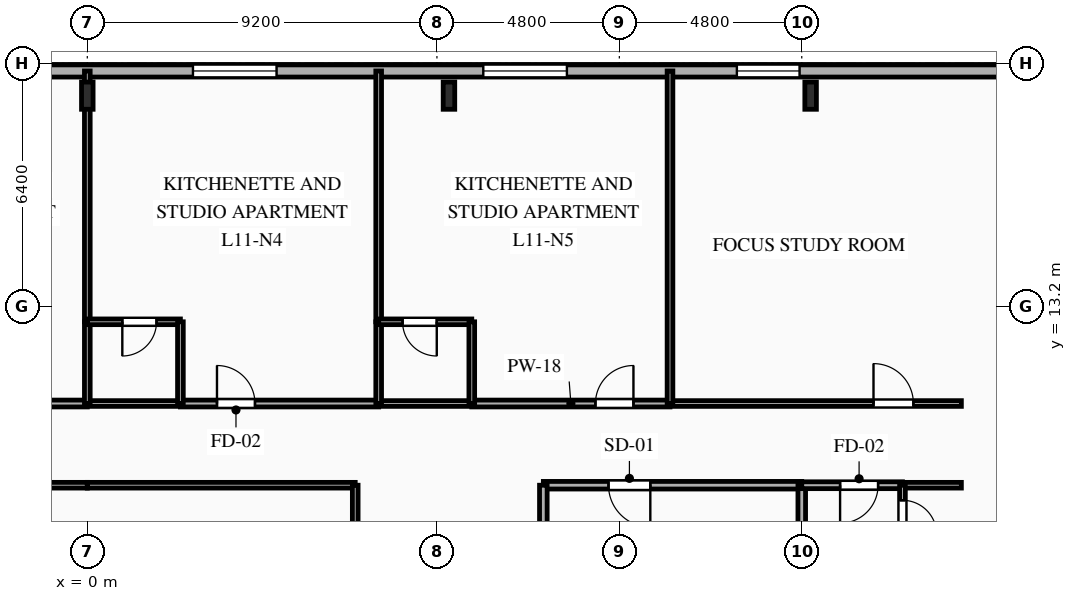
"""IFC4 building model, lengths in metres.
Left out: names, types, materials, properties, quantities, classifications, styles, units other than length and angle.
Written with IfcOpenShell. Run it as: python <this file> out.ifc"""

import sys

from ifc_helpers import new_model, si_unit, direction, frame, frame_2d, origin, origin_2d, place, context, subcontext, project, spatial, rectangle, i_section, extrude, element, fill, save


model = new_model("IFC4")
c1 = context("Model", 3, precision=1e-05, world=origin(), true_north=direction((0.0, 1.0)))
c2 = subcontext(c1, "Body", "Model", "MODEL_VIEW")
j1 = project(units=[si_unit("LENGTHUNIT", "METRE"), si_unit("PLANEANGLEUNIT", "RADIAN")], contexts=[c1])
p1 = place(None, origin())
s1 = spatial("IfcSite", under=j1, at=p1, CompositionType="ELEMENT")
p2 = place(p1, origin())
s2 = spatial("IfcBuilding", under=s1, at=p2, CompositionType="ELEMENT")
p3 = place(p2, frame((0.0, 0.0, 43.75)))
s3 = spatial("IfcBuildingStorey", under=s2, at=p3, CompositionType="ELEMENT", Elevation=43.75)
for number, where, z_axis, x_axis in (
    (1, (19.033, 18.75, 0.0), (0.0, 0.0, 1.0), (1.0, 0.0, 0.0)),
    (2, (9.517, 18.75, 0.0), (0.0, 0.0, 1.0), (1.0, 0.0, 0.0)),
    (3, (0.0, 18.75, 0.0), (0.0, 0.0, 1.0), (1.0, 0.0, 0.0)),
):
    element("IfcColumn", number, at=place(p3, frame(where, z_axis=z_axis, x_axis=x_axis)), inside=s3, PredefinedType="COLUMN", context=c2, shape_type="SweptSolid", body=[
        extrude(i_section(OverallWidth=0.304, OverallDepth=0.716, WebThickness=0.021, FlangeThickness=0.04, FilletRadius=0.027, at=origin_2d()), origin(), (0.0, 0.0, 1.0), 3.35),
    ])
p4 = place(p3, frame((-29.2, 19.4, 0.0), z_axis=(0.0, 0.0, 1.0), x_axis=(1.0, 0.0, 0.0)))
e4 = element("IfcWall", 4, at=p4, inside=s3, PredefinedType="SOLIDWALL", context=c2, shape_type="SweptSolid", body=[
    extrude(rectangle(XDim=58.4, YDim=0.32, at=frame_2d((29.2, 0.0))), origin(), (0.0, 0.0, 1.0), 3.035),
])
p5 = place(p4, frame((7.972, 0.0, 0.85)))
e5 = element("IfcOpeningElement", 5, at=p5, cuts=e4, PredefinedType="OPENING", context=c2, shape_type="SweptSolid", body=[
    extrude(rectangle(XDim=1.65, YDim=1.85, at=frame_2d((0.825, 0.925))), frame((0.0, 0.17, 0.0), z_axis=(0.0, -1.0, 0.0), x_axis=(1.0, 0.0, 0.0)), (0.0, 0.0, 1.0), 0.34),
])
p6 = place(p4, frame((17.691, 0.0, 0.85)))
e6 = element("IfcOpeningElement", 6, at=p6, cuts=e4, PredefinedType="OPENING", context=c2, shape_type="SweptSolid", body=[
    extrude(rectangle(XDim=1.6, YDim=1.85, at=frame_2d((0.8, 0.925))), frame((0.0, 0.17, 0.0), z_axis=(0.0, -1.0, 0.0), x_axis=(1.0, 0.0, 0.0)), (0.0, 0.0, 1.0), 0.34),
])
p7 = place(p4, frame((24.3, 0.0, 0.85)))
e7 = element("IfcOpeningElement", 7, at=p7, cuts=e4, PredefinedType="OPENING", context=c2, shape_type="SweptSolid", body=[
    extrude(rectangle(XDim=2.2, YDim=1.85, at=frame_2d((1.1, 0.925))), frame((0.0, 0.17, 0.0), z_axis=(0.0, -1.0, 0.0), x_axis=(1.0, 0.0, 0.0)), (0.0, 0.0, 1.0), 0.34),
])
p8 = place(p4, frame((31.98, 0.0, 0.85)))
e8 = element("IfcOpeningElement", 8, at=p8, cuts=e4, PredefinedType="OPENING", context=c2, shape_type="SweptSolid", body=[
    extrude(rectangle(XDim=2.2, YDim=1.85, at=frame_2d((1.1, 0.925))), frame((0.0, 0.17, 0.0), z_axis=(0.0, -1.0, 0.0), x_axis=(1.0, 0.0, 0.0)), (0.0, 0.0, 1.0), 0.34),
])
p9 = place(p4, frame((39.62, 0.0, 0.85)))
e9 = element("IfcOpeningElement", 9, at=p9, cuts=e4, PredefinedType="OPENING", context=c2, shape_type="SweptSolid", body=[
    extrude(rectangle(XDim=2.2, YDim=1.85, at=frame_2d((1.1, 0.925))), frame((0.0, 0.17, 0.0), z_axis=(0.0, -1.0, 0.0), x_axis=(1.0, 0.0, 0.0)), (0.0, 0.0, 1.0), 0.34),
])
p10 = place(p4, frame((46.292, 0.0, 0.85)))
e10 = element("IfcOpeningElement", 10, at=p10, cuts=e4, PredefinedType="OPENING", context=c2, shape_type="SweptSolid", body=[
    extrude(rectangle(XDim=1.65, YDim=1.85, at=frame_2d((0.825, 0.925))), frame((0.0, 0.17, 0.0), z_axis=(0.0, -1.0, 0.0), x_axis=(1.0, 0.0, 0.0)), (0.0, 0.0, 1.0), 0.34),
])
p11 = place(p3, frame((18.8, 8.5, 0.0), z_axis=(0.0, 0.0, 1.0), x_axis=(-1.0, 0.0, 0.0)))
e11 = element("IfcWall", 11, at=p11, inside=s3, PredefinedType="PARTITIONING", context=c2, shape_type="SweptSolid", body=[
    extrude(rectangle(XDim=6.8, YDim=0.2, at=frame_2d((3.4, 0.0))), origin(), (0.0, 0.0, 1.0), 3.035),
])
p12 = place(p11, frame((3.985, 0.0, 0.0)))
e12 = element("IfcOpeningElement", 12, at=p12, cuts=e11, PredefinedType="OPENING", context=c2, shape_type="SweptSolid", body=[
    extrude(rectangle(XDim=1.1, YDim=2.15, at=frame_2d((0.55, 1.075))), frame((0.0, 0.11, 0.0), z_axis=(0.0, -1.0, 0.0), x_axis=(1.0, 0.0, 0.0)), (0.0, 0.0, 1.0), 0.22),
])
p13 = place(p3, frame((12.0, 8.5, 0.0), z_axis=(0.0, 0.0, 1.0), x_axis=(0.0, -1.0, 0.0)))
e13 = element("IfcWall", 13, at=p13, inside=s3, PredefinedType="PARTITIONING", context=c2, shape_type="SweptSolid", body=[
    extrude(rectangle(XDim=2.9, YDim=0.2, at=frame_2d((1.45, 0.0))), origin(), (0.0, 0.0, 1.0), 3.035),
])
p14 = place(p3, frame((18.8, 5.6, 0.0), z_axis=(0.0, 0.0, 1.0), x_axis=(0.0, 1.0, 0.0)))
e14 = element("IfcWall", 14, at=p14, inside=s3, PredefinedType="PARTITIONING", context=c2, shape_type="SweptSolid", body=[
    extrude(rectangle(XDim=2.9, YDim=0.2, at=frame_2d((1.45, 0.0))), origin(), (0.0, 0.0, 1.0), 2.52),
])
p15 = place(p3, frame((-5.217, 10.65, 0.0), z_axis=(0.0, 0.0, 1.0), x_axis=(1.0, 0.0, 0.0)))
e15 = element("IfcWall", 15, at=p15, inside=s3, PredefinedType="PARTITIONING", context=c2, shape_type="SweptSolid", body=[
    extrude(rectangle(XDim=5.217, YDim=0.18, at=frame_2d((2.608, 0.0))), origin(), (0.0, 0.0, 1.0), 3.035),
])
p16 = place(p15, frame((2.873, 0.0, 0.0)))
e16 = element("IfcOpeningElement", 16, at=p16, cuts=e15, PredefinedType="OPENING", context=c2, shape_type="SweptSolid", body=[
    extrude(rectangle(XDim=1.0, YDim=2.15, at=frame_2d((0.5, 1.075))), frame((0.0, 0.1, 0.0), z_axis=(0.0, -1.0, 0.0), x_axis=(1.0, 0.0, 0.0)), (0.0, 0.0, 1.0), 0.2),
])
p17 = place(p3, frame((0.0, 8.5, 0.0), z_axis=(0.0, 0.0, 1.0), x_axis=(-1.0, 0.0, 0.0)))
e17 = element("IfcWall", 17, at=p17, inside=s3, PredefinedType="PARTITIONING", context=c2, shape_type="SweptSolid", body=[
    extrude(rectangle(XDim=7.05, YDim=0.15, at=frame_2d((3.525, 0.0))), origin(), (0.0, 0.0, 1.0), 3.035),
])
p18 = place(p17, frame((1.185, 0.0, 0.0)))
e18 = element("IfcOpeningElement", 18, at=p18, cuts=e17, PredefinedType="OPENING", context=c2, shape_type="SweptSolid", body=[
    extrude(rectangle(XDim=1.05, YDim=2.15, at=frame_2d((0.525, 1.075))), frame((0.0, 0.085, 0.0), z_axis=(0.0, -1.0, 0.0), x_axis=(1.0, 0.0, 0.0)), (0.0, 0.0, 1.0), 0.17),
])
p19 = place(p3, frame((21.45, 8.5, 0.0), z_axis=(0.0, 0.0, 1.0), x_axis=(-1.0, 0.0, 0.0)))
e19 = element("IfcWall", 19, at=p19, inside=s3, PredefinedType="PARTITIONING", context=c2, shape_type="SweptSolid", body=[
    extrude(rectangle(XDim=2.65, YDim=0.18, at=frame_2d((1.325, 0.0))), origin(), (0.0, 0.0, 1.0), 3.035),
])
p20 = place(p19, frame((0.641, 0.0, 0.0)))
e20 = element("IfcOpeningElement", 20, at=p20, cuts=e19, PredefinedType="OPENING", context=c2, shape_type="SweptSolid", body=[
    extrude(rectangle(XDim=1.0, YDim=2.15, at=frame_2d((0.5, 1.075))), frame((0.0, 0.1, 0.0), z_axis=(0.0, -1.0, 0.0), x_axis=(1.0, 0.0, 0.0)), (0.0, 0.0, 1.0), 0.2),
])
p21 = place(p3, frame((23.0, 8.5, 0.0), z_axis=(0.0, 0.0, 1.0), x_axis=(-1.0, 0.0, 0.0)))
e21 = element("IfcWall", 21, at=p21, inside=s3, PredefinedType="PARTITIONING", context=c2, shape_type="SweptSolid", body=[
    extrude(rectangle(XDim=1.55, YDim=0.15, at=frame_2d((0.775, 0.0))), origin(), (0.0, 0.0, 1.0), 3.035),
])
p22 = place(p3, frame((2.45, 10.65, 0.0), z_axis=(0.0, 0.0, 1.0), x_axis=(1.0, 0.0, 0.0)))
e22 = element("IfcWall", 22, at=p22, inside=s3, PredefinedType="PARTITIONING", context=c2, shape_type="SweptSolid", body=[
    extrude(rectangle(XDim=5.217, YDim=0.18, at=frame_2d((2.608, 0.0))), origin(), (0.0, 0.0, 1.0), 3.035),
])
p23 = place(p22, frame((0.962, 0.0, 0.0)))
e23 = element("IfcOpeningElement", 23, at=p23, cuts=e22, PredefinedType="OPENING", context=c2, shape_type="SweptSolid", body=[
    extrude(rectangle(XDim=1.0, YDim=2.15, at=frame_2d((0.5, 1.075))), frame((0.0, 0.1, 0.0), z_axis=(0.0, -1.0, 0.0), x_axis=(1.0, 0.0, 0.0)), (0.0, 0.0, 1.0), 0.2),
])
p24 = place(p3, frame((0.0, 10.65, 0.0), z_axis=(0.0, 0.0, 1.0), x_axis=(1.0, 0.0, 0.0)))
e24 = element("IfcWall", 24, at=p24, inside=s3, PredefinedType="PLUMBINGWALL", context=c2, shape_type="SweptSolid", body=[
    extrude(rectangle(XDim=2.45, YDim=0.15, at=frame_2d((1.225, 0.0))), origin(), (0.0, 0.0, 1.0), 3.035),
])
p25 = place(p3, frame((10.117, 10.65, 0.0), z_axis=(0.0, 0.0, 1.0), x_axis=(1.0, 0.0, 0.0)))
e25 = element("IfcWall", 25, at=p25, inside=s3, PredefinedType="PARTITIONING", context=c2, shape_type="SweptSolid", body=[
    extrude(rectangle(XDim=5.216, YDim=0.18, at=frame_2d((2.608, 0.0))), origin(), (0.0, 0.0, 1.0), 3.035),
])
p26 = place(p25, frame((3.254, 0.0, 0.0)))
e26 = element("IfcOpeningElement", 26, at=p26, cuts=e25, PredefinedType="OPENING", context=c2, shape_type="SweptSolid", body=[
    extrude(rectangle(XDim=1.0, YDim=2.15, at=frame_2d((0.5, 1.075))), frame((0.0, 0.1, 0.0), z_axis=(0.0, -1.0, 0.0), x_axis=(1.0, 0.0, 0.0)), (0.0, 0.0, 1.0), 0.2),
])
p27 = place(p3, frame((7.667, 10.65, 0.0), z_axis=(0.0, 0.0, 1.0), x_axis=(1.0, 0.0, 0.0)))
e27 = element("IfcWall", 27, at=p27, inside=s3, PredefinedType="PLUMBINGWALL", context=c2, shape_type="SweptSolid", body=[
    extrude(rectangle(XDim=2.45, YDim=0.15, at=frame_2d((1.225, 0.0))), origin(), (0.0, 0.0, 1.0), 3.035),
])
p28 = place(p3, frame((15.333, 10.65, 0.0), z_axis=(0.0, 0.0, 1.0), x_axis=(1.0, 0.0, 0.0)))
e28 = element("IfcWall", 28, at=p28, inside=s3, PredefinedType="PARTITIONING", context=c2, shape_type="SweptSolid", body=[
    extrude(rectangle(XDim=7.667, YDim=0.15, at=frame_2d((3.833, 0.0))), origin(), (0.0, 0.0, 1.0), 3.035),
])
p29 = place(p28, frame((5.355, 0.0, 0.0)))
e29 = element("IfcOpeningElement", 29, at=p29, cuts=e28, PredefinedType="OPENING", context=c2, shape_type="SweptSolid", body=[
    extrude(rectangle(XDim=1.05, YDim=2.15, at=frame_2d((0.525, 1.075))), frame((0.0, 0.085, 0.0), z_axis=(0.0, -1.0, 0.0), x_axis=(1.0, 0.0, 0.0)), (0.0, 0.0, 1.0), 0.17),
])
for number, where, z_axis, x_axis in (
    (30, (7.05, 8.5, 0.0), (0.0, 0.0, 1.0), (-1.0, 0.0, 0.0)),
    (31, (7.05, 1.45, 0.0), (0.0, 0.0, 1.0), (0.0, 1.0, 0.0)),
):
    element("IfcWall", number, at=place(p3, frame(where, z_axis=z_axis, x_axis=x_axis)), inside=s3, PredefinedType="PARTITIONING", context=c2, shape_type="SweptSolid", body=[
        extrude(rectangle(XDim=7.05, YDim=0.15, at=frame_2d((3.525, 0.0))), origin(), (0.0, 0.0, 1.0), 3.035),
    ])
p30 = place(p3, frame((21.45, 8.5, 0.0), z_axis=(0.0, 0.0, 1.0), x_axis=(0.0, -1.0, 0.0)))
e32 = element("IfcWall", 32, at=p30, inside=s3, PredefinedType="PARTITIONING", context=c2, shape_type="SweptSolid", body=[
    extrude(rectangle(XDim=1.692, YDim=0.15, at=frame_2d((0.846, 0.0))), origin(), (0.0, 0.0, 1.0), 3.035),
])
p31 = place(p30, frame((0.396, 0.0, 0.0)))
e33 = element("IfcOpeningElement", 33, at=p31, cuts=e32, PredefinedType="OPENING", context=c2, shape_type="SweptSolid", body=[
    extrude(rectangle(XDim=0.9, YDim=2.1, at=frame_2d((0.45, 1.05))), frame((0.0, 0.085, 0.0), z_axis=(0.0, -1.0, 0.0), x_axis=(1.0, 0.0, 0.0)), (0.0, 0.0, 1.0), 0.17),
])
p32 = place(p3, frame((0.0, 19.4, 0.0), z_axis=(0.0, 0.0, 1.0), x_axis=(0.0, -1.0, 0.0)))
e34 = element("IfcWall", 34, at=p32, inside=s3, PredefinedType="PARTITIONING", context=c2, shape_type="SweptSolid", body=[
    extrude(rectangle(XDim=6.6, YDim=0.15, at=frame_2d((3.3, 0.0))), origin(), (0.0, 0.0, 1.0), 3.035),
])
p33 = place(p3, frame((0.0, 12.8, 0.0), z_axis=(0.0, 0.0, 1.0), x_axis=(0.0, -1.0, 0.0)))
e35 = element("IfcWall", 35, at=p33, inside=s3, PredefinedType="PLUMBINGWALL", context=c2, shape_type="SweptSolid", body=[
    extrude(rectangle(XDim=2.15, YDim=0.15, at=frame_2d((1.075, 0.0))), origin(), (0.0, 0.0, 1.0), 3.035),
])
p34 = place(p3, frame((2.45, 12.8, 0.0), z_axis=(0.0, 0.0, 1.0), x_axis=(-1.0, 0.0, 0.0)))
e36 = element("IfcWall", 36, at=p34, inside=s3, PredefinedType="PLUMBINGWALL", context=c2, shape_type="SweptSolid", body=[
    extrude(rectangle(XDim=2.45, YDim=0.15, at=frame_2d((1.225, 0.0))), origin(), (0.0, 0.0, 1.0), 3.035),
])
p35 = place(p34, frame((0.629, 0.0, 0.0)))
e37 = element("IfcOpeningElement", 37, at=p35, cuts=e36, PredefinedType="OPENING", context=c2, shape_type="SweptSolid", body=[
    extrude(rectangle(XDim=0.9, YDim=2.1, at=frame_2d((0.45, 1.05))), frame((0.0, 0.085, 0.0), z_axis=(0.0, -1.0, 0.0), x_axis=(1.0, 0.0, 0.0)), (0.0, 0.0, 1.0), 0.17),
])
p36 = place(p3, frame((2.45, 10.65, 0.0), z_axis=(0.0, 0.0, 1.0), x_axis=(0.0, 1.0, 0.0)))
e38 = element("IfcWall", 38, at=p36, inside=s3, PredefinedType="PLUMBINGWALL", context=c2, shape_type="SweptSolid", body=[
    extrude(rectangle(XDim=2.15, YDim=0.15, at=frame_2d((1.075, 0.0))), origin(), (0.0, 0.0, 1.0), 3.035),
])
p37 = place(p3, frame((7.667, 19.4, 0.0), z_axis=(0.0, 0.0, 1.0), x_axis=(0.0, -1.0, 0.0)))
e39 = element("IfcWall", 39, at=p37, inside=s3, PredefinedType="PARTITIONING", context=c2, shape_type="SweptSolid", body=[
    extrude(rectangle(XDim=6.6, YDim=0.15, at=frame_2d((3.3, 0.0))), origin(), (0.0, 0.0, 1.0), 3.035),
])
p38 = place(p3, frame((7.667, 12.8, 0.0), z_axis=(0.0, 0.0, 1.0), x_axis=(0.0, -1.0, 0.0)))
e40 = element("IfcWall", 40, at=p38, inside=s3, PredefinedType="PLUMBINGWALL", context=c2, shape_type="SweptSolid", body=[
    extrude(rectangle(XDim=2.15, YDim=0.15, at=frame_2d((1.075, 0.0))), origin(), (0.0, 0.0, 1.0), 3.035),
])
p39 = place(p3, frame((10.117, 12.8, 0.0), z_axis=(0.0, 0.0, 1.0), x_axis=(-1.0, 0.0, 0.0)))
e41 = element("IfcWall", 41, at=p39, inside=s3, PredefinedType="PLUMBINGWALL", context=c2, shape_type="SweptSolid", body=[
    extrude(rectangle(XDim=2.45, YDim=0.15, at=frame_2d((1.225, 0.0))), origin(), (0.0, 0.0, 1.0), 3.035),
])
p40 = place(p39, frame((0.921, 0.0, 0.0)))
e42 = element("IfcOpeningElement", 42, at=p40, cuts=e41, PredefinedType="OPENING", context=c2, shape_type="SweptSolid", body=[
    extrude(rectangle(XDim=0.9, YDim=2.1, at=frame_2d((0.45, 1.05))), frame((0.0, 0.085, 0.0), z_axis=(0.0, -1.0, 0.0), x_axis=(1.0, 0.0, 0.0)), (0.0, 0.0, 1.0), 0.17),
])
p41 = place(p3, frame((10.117, 10.65, 0.0), z_axis=(0.0, 0.0, 1.0), x_axis=(0.0, 1.0, 0.0)))
e43 = element("IfcWall", 43, at=p41, inside=s3, PredefinedType="PLUMBINGWALL", context=c2, shape_type="SweptSolid", body=[
    extrude(rectangle(XDim=2.15, YDim=0.15, at=frame_2d((1.075, 0.0))), origin(), (0.0, 0.0, 1.0), 3.035),
])
p42 = place(p3, frame((15.333, 19.4, 0.0), z_axis=(0.0, 0.0, 1.0), x_axis=(0.0, -1.0, 0.0)))
e44 = element("IfcWall", 44, at=p42, inside=s3, PredefinedType="PARTITIONING", context=c2, shape_type="SweptSolid", body=[
    extrude(rectangle(XDim=8.75, YDim=0.15, at=frame_2d((4.375, 0.0))), origin(), (0.0, 0.0, 1.0), 3.035),
])
p43 = place(p8, origin())
e45 = element("IfcWindow", 45, at=p43, inside=s3, PartitioningType="SINGLE_PANEL", PredefinedType="WINDOW", context=c2, shape_type="SweptSolid", body=[
    extrude(rectangle(XDim=2.2, YDim=1.85, at=frame_2d((1.1, 0.925))), frame((0.0, 0.03, 0.0), z_axis=(0.0, -1.0, 0.0), x_axis=(1.0, 0.0, 0.0)), (0.0, 0.0, 1.0), 0.06),
])
fill(e8, e45)
p44 = place(p9, origin())
e46 = element("IfcWindow", 46, at=p44, inside=s3, PartitioningType="SINGLE_PANEL", PredefinedType="WINDOW", context=c2, shape_type="SweptSolid", body=[
    extrude(rectangle(XDim=2.2, YDim=1.85, at=frame_2d((1.1, 0.925))), frame((0.0, 0.03, 0.0), z_axis=(0.0, -1.0, 0.0), x_axis=(1.0, 0.0, 0.0)), (0.0, 0.0, 1.0), 0.06),
])
fill(e9, e46)
p45 = place(p10, origin())
e47 = element("IfcWindow", 47, at=p45, inside=s3, PartitioningType="SINGLE_PANEL", PredefinedType="WINDOW", context=c2, shape_type="SweptSolid", body=[
    extrude(rectangle(XDim=1.65, YDim=1.85, at=frame_2d((0.825, 0.925))), frame((0.0, 0.03, 0.0), z_axis=(0.0, -1.0, 0.0), x_axis=(1.0, 0.0, 0.0)), (0.0, 0.0, 1.0), 0.06),
])
fill(e10, e47)
p46 = place(p12, origin())
e48 = element("IfcDoor", 48, at=p46, inside=s3, OperationType="SINGLE_SWING_LEFT", PredefinedType="DOOR", context=c2, shape_type="SweptSolid", body=[
    extrude(rectangle(XDim=1.1, YDim=2.15, at=frame_2d((0.55, 1.075))), frame((0.0, 0.025, 0.0), z_axis=(0.0, -1.0, 0.0), x_axis=(1.0, 0.0, 0.0)), (0.0, 0.0, 1.0), 0.05),
])
fill(e12, e48)
p47 = place(p20, origin())
e49 = element("IfcDoor", 49, at=p47, inside=s3, OperationType="SINGLE_SWING_RIGHT", PredefinedType="DOOR", context=c2, shape_type="SweptSolid", body=[
    extrude(rectangle(XDim=1.0, YDim=2.15, at=frame_2d((0.5, 1.075))), frame((0.0, 0.025, 0.0), z_axis=(0.0, -1.0, 0.0), x_axis=(1.0, 0.0, 0.0)), (0.0, 0.0, 1.0), 0.05),
])
fill(e20, e49)
p48 = place(p23, origin())
e50 = element("IfcDoor", 50, at=p48, inside=s3, OperationType="SINGLE_SWING_LEFT", PredefinedType="DOOR", context=c2, shape_type="SweptSolid", body=[
    extrude(rectangle(XDim=1.0, YDim=2.15, at=frame_2d((0.5, 1.075))), frame((0.0, 0.025, 0.0), z_axis=(0.0, -1.0, 0.0), x_axis=(1.0, 0.0, 0.0)), (0.0, 0.0, 1.0), 0.05),
])
fill(e23, e50)
p49 = place(p26, origin())
e51 = element("IfcDoor", 51, at=p49, inside=s3, OperationType="SINGLE_SWING_RIGHT", PredefinedType="DOOR", context=c2, shape_type="SweptSolid", body=[
    extrude(rectangle(XDim=1.0, YDim=2.15, at=frame_2d((0.5, 1.075))), frame((0.0, 0.025, 0.0), z_axis=(0.0, -1.0, 0.0), x_axis=(1.0, 0.0, 0.0)), (0.0, 0.0, 1.0), 0.05),
])
fill(e26, e51)
p50 = place(p29, origin())
e52 = element("IfcDoor", 52, at=p50, inside=s3, OperationType="SINGLE_SWING_LEFT", PredefinedType="DOOR", context=c2, shape_type="SweptSolid", body=[
    extrude(rectangle(XDim=1.05, YDim=2.15, at=frame_2d((0.525, 1.075))), frame((0.0, 0.025, 0.0), z_axis=(0.0, -1.0, 0.0), x_axis=(1.0, 0.0, 0.0)), (0.0, 0.0, 1.0), 0.05),
])
fill(e29, e52)
p51 = place(p31, origin())
e53 = element("IfcDoor", 53, at=p51, inside=s3, OperationType="SINGLE_SWING_RIGHT", PredefinedType="DOOR", context=c2, shape_type="SweptSolid", body=[
    extrude(rectangle(XDim=0.9, YDim=2.1, at=frame_2d((0.45, 1.05))), frame((0.0, 0.025, 0.0), z_axis=(0.0, -1.0, 0.0), x_axis=(1.0, 0.0, 0.0)), (0.0, 0.0, 1.0), 0.05),
])
fill(e33, e53)
p52 = place(p35, origin())
e54 = element("IfcDoor", 54, at=p52, inside=s3, OperationType="SINGLE_SWING_RIGHT", PredefinedType="DOOR", context=c2, shape_type="SweptSolid", body=[
    extrude(rectangle(XDim=0.9, YDim=2.1, at=frame_2d((0.45, 1.05))), frame((0.0, 0.025, 0.0), z_axis=(0.0, -1.0, 0.0), x_axis=(1.0, 0.0, 0.0)), (0.0, 0.0, 1.0), 0.05),
])
fill(e37, e54)
p53 = place(p40, origin())
e55 = element("IfcDoor", 55, at=p53, inside=s3, OperationType="SINGLE_SWING_LEFT", PredefinedType="DOOR", context=c2, shape_type="SweptSolid", body=[
    extrude(rectangle(XDim=0.9, YDim=2.1, at=frame_2d((0.45, 1.05))), frame((0.0, 0.025, 0.0), z_axis=(0.0, -1.0, 0.0), x_axis=(1.0, 0.0, 0.0)), (0.0, 0.0, 1.0), 0.05),
])
fill(e42, e55)
save(model, sys.argv[1])
